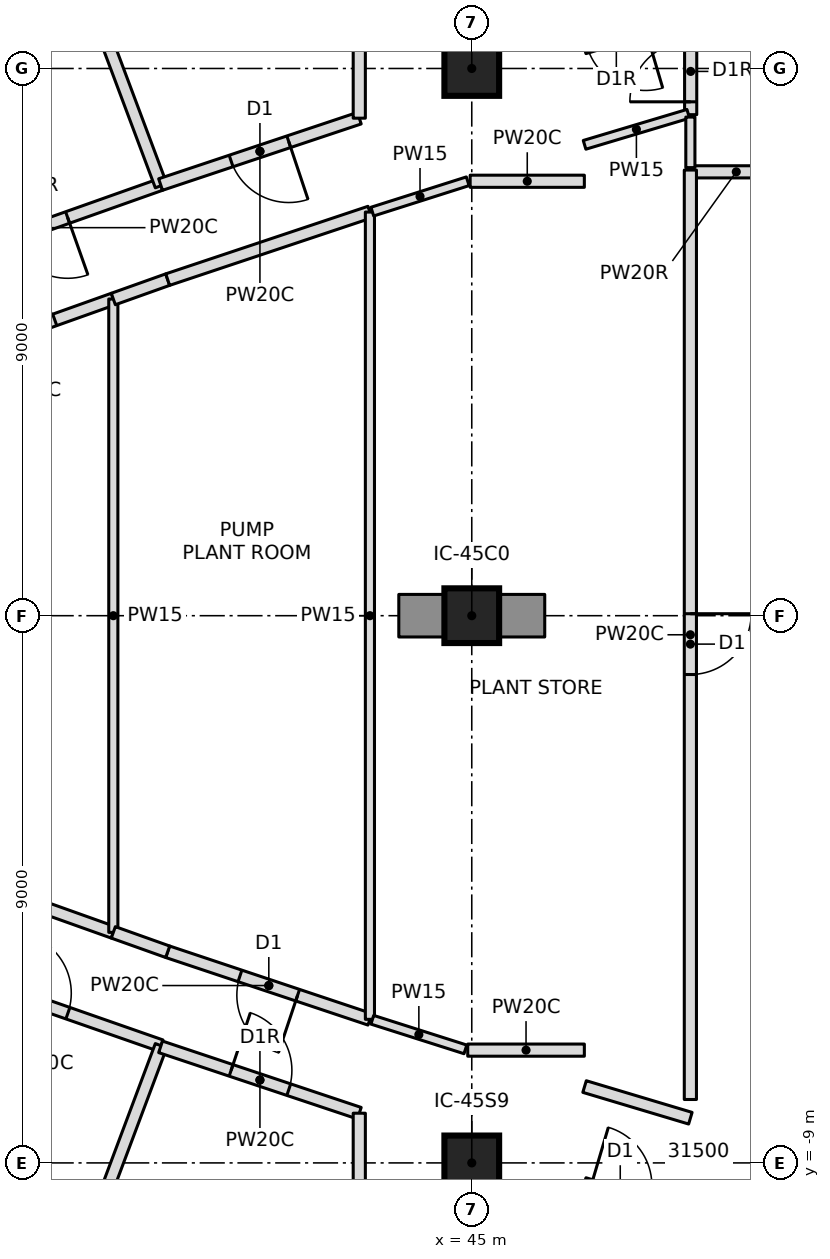
"""IFC4 building model, lengths in metres.
Left out: names, types, materials, properties, quantities, classifications, styles, units other than length and angle.
Written with IfcOpenShell. Run it as: python <this file> out.ifc"""

import sys

from ifc_helpers import new_model, si_unit, direction, frame, frame_2d, origin, origin_2d, place, context, subcontext, project, spatial, rectangle, extrude, element, fill, save


model = new_model("IFC4")
c1 = context("Model", 3, precision=1e-05, world=origin(), true_north=direction((0.0, 1.0)))
c2 = subcontext(c1, "Body", "Model", "MODEL_VIEW")
j1 = project(units=[si_unit("LENGTHUNIT", "METRE"), si_unit("PLANEANGLEUNIT", "RADIAN")], contexts=[c1])
p1 = place(None, origin())
s1 = spatial("IfcSite", under=j1, at=p1, CompositionType="ELEMENT")
p2 = place(p1, origin())
s2 = spatial("IfcBuilding", under=s1, at=p2, CompositionType="ELEMENT")
p3 = place(p2, frame((0.0, 0.0, 256.3)))
s3 = spatial("IfcBuildingStorey", under=s2, at=p3, CompositionType="ELEMENT", Elevation=256.3)
for number, where, z_axis, x_axis in (
    (1, (45.0, -9.0, 0.0), (0.0, 0.0, 1.0), (1.0, 0.0, 0.0)),
    (2, (45.0, 0.0, 0.0), (0.0, 0.0, 1.0), (1.0, 0.0, 0.0)),
    (3, (45.0, 9.0, 0.0), (0.0, 0.0, 1.0), (1.0, 0.0, 0.0)),
):
    element("IfcColumn", number, at=place(p3, frame(where, z_axis=z_axis, x_axis=x_axis)), inside=s3, PredefinedType="COLUMN", context=c2, shape_type="SweptSolid", body=[
        extrude(rectangle(XDim=0.9, YDim=0.9, at=origin_2d()), origin(), (0.0, 0.0, 1.0), 7.0),
    ])
p4 = place(p3, frame((43.8, 0.0, 0.0), z_axis=(0.0, 0.0, 1.0), x_axis=(1.0, 0.0, 0.0)))
e4 = element("IfcWall", 4, at=p4, inside=s3, PredefinedType="SHEAR", context=c2, shape_type="SweptSolid", body=[
    extrude(rectangle(XDim=2.4, YDim=0.7, at=frame_2d((1.2, 0.0))), origin(), (0.0, 0.0, 1.0), 6.7),
])
p5 = place(p3, frame((48.6, 7.3, 0.0), z_axis=(0.0, 0.0, 1.0), x_axis=(1.0, 0.0, 0.0)))
e5 = element("IfcWall", 5, at=p5, inside=s3, PredefinedType="PARTITIONING", context=c2, shape_type="SweptSolid", body=[
    extrude(rectangle(XDim=1.5, YDim=0.2, at=frame_2d((0.75, 0.0))), origin(), (0.0, 0.0, 1.0), 6.7),
])
p6 = place(p3, frame((39.882, 7.091, 0.0), z_axis=(0.0, 0.0, 1.0), x_axis=(-0.942537055217, -0.334101630559, 0.0)))
e6 = element("IfcWall", 6, at=p6, inside=s3, PredefinedType="PARTITIONING", context=c2, shape_type="SweptSolid", body=[
    extrude(rectangle(XDim=4.244, YDim=0.2, at=frame_2d((2.122, 0.0))), origin(), (0.0, 0.0, 1.0), 6.7),
])
p7 = place(p6, frame((1.622, 0.0, 0.0)))
e7 = element("IfcOpeningElement", 7, at=p7, cuts=e6, PredefinedType="OPENING", context=c2, shape_type="SweptSolid", body=[
    extrude(rectangle(XDim=1.0, YDim=2.1, at=frame_2d((0.5, 1.05))), frame((0.0, 0.11, 0.0), z_axis=(0.0, -1.0, 0.0), x_axis=(1.0, 0.0, 0.0)), (0.0, 0.0, 1.0), 0.22),
])
p8 = place(p3, frame((39.889, 7.072, 0.0), z_axis=(0.0, 0.0, 1.0), x_axis=(-0.35112895446, 0.936327110224, 0.0)))
e8 = element("IfcWall", 8, at=p8, inside=s3, PredefinedType="PARTITIONING", context=c2, shape_type="SweptSolid", body=[
    extrude(rectangle(XDim=9.706, YDim=0.2, at=frame_2d((4.853, 0.0))), origin(), (0.0, 0.0, 1.0), 6.7),
])
p9 = place(p3, frame((43.15, 8.183, 0.0), z_axis=(0.0, 0.0, 1.0), x_axis=(-0.948477584784, -0.316844238013, 0.0)))
e9 = element("IfcWall", 9, at=p9, inside=s3, PredefinedType="PARTITIONING", context=c2, shape_type="SweptSolid", body=[
    extrude(rectangle(XDim=3.445, YDim=0.2, at=frame_2d((1.723, 0.0))), origin(), (0.0, 0.0, 1.0), 6.7),
])
p10 = place(p9, frame((1.222, 0.0, 0.0)))
e10 = element("IfcOpeningElement", 10, at=p10, cuts=e9, PredefinedType="OPENING", context=c2, shape_type="SweptSolid", body=[
    extrude(rectangle(XDim=1.0, YDim=2.1, at=frame_2d((0.5, 1.05))), frame((0.0, 0.11, 0.0), z_axis=(0.0, -1.0, 0.0), x_axis=(1.0, 0.0, 0.0)), (0.0, 0.0, 1.0), 0.22),
])
p11 = place(p3, frame((47.969, 9.671, 0.0), z_axis=(0.0, 0.0, 1.0), x_axis=(-0.958867721668, -0.283853293696, 0.0)))
e11 = element("IfcWall", 11, at=p11, inside=s3, PredefinedType="PARTITIONING", context=c2, shape_type="SweptSolid", body=[
    extrude(rectangle(XDim=1.167, YDim=0.2, at=frame_2d((0.583, 0.0))), origin(), (0.0, 0.0, 1.0), 6.7),
])
p12 = place(p11, frame((0.117, 0.0, 0.0)))
e12 = element("IfcOpeningElement", 12, at=p12, cuts=e11, PredefinedType="OPENING", context=c2, shape_type="SweptSolid", body=[
    extrude(rectangle(XDim=1.0, YDim=2.1, at=frame_2d((0.5, 1.05))), frame((0.0, 0.11, 0.0), z_axis=(0.0, -1.0, 0.0), x_axis=(1.0, 0.0, 0.0)), (0.0, 0.0, 1.0), 0.22),
])
p13 = place(p3, frame((35.882, -5.673, 0.0), z_axis=(0.0, 0.0, 1.0), x_axis=(0.944107376821, -0.329638075823, 0.0)))
e13 = element("IfcWall", 13, at=p13, inside=s3, PredefinedType="PARTITIONING", context=c2, shape_type="SweptSolid", body=[
    extrude(rectangle(XDim=4.245, YDim=0.2, at=frame_2d((2.122, 0.0))), origin(), (0.0, 0.0, 1.0), 6.7),
])
p14 = place(p13, frame((1.622, 0.0, 0.0)))
e14 = element("IfcOpeningElement", 14, at=p14, cuts=e13, PredefinedType="OPENING", context=c2, shape_type="SweptSolid", body=[
    extrude(rectangle(XDim=1.0, YDim=2.1, at=frame_2d((0.5, 1.05))), frame((0.0, 0.11, 0.0), z_axis=(0.0, -1.0, 0.0), x_axis=(1.0, 0.0, 0.0)), (0.0, 0.0, 1.0), 0.22),
])
p15 = place(p3, frame((36.481, -16.161, 0.0), z_axis=(0.0, 0.0, 1.0), x_axis=(0.35112895446, 0.936327110224, 0.0)))
e15 = element("IfcWall", 15, at=p15, inside=s3, PredefinedType="PARTITIONING", context=c2, shape_type="SweptSolid", body=[
    extrude(rectangle(XDim=9.706, YDim=0.2, at=frame_2d((4.853, 0.0))), origin(), (0.0, 0.0, 1.0), 6.7),
])
p16 = place(p3, frame((39.882, -7.091, 0.0), z_axis=(0.0, 0.0, 1.0), x_axis=(0.948477584784, -0.316844238013, 0.0)))
e16 = element("IfcWall", 16, at=p16, inside=s3, PredefinedType="PARTITIONING", context=c2, shape_type="SweptSolid", body=[
    extrude(rectangle(XDim=3.445, YDim=0.2, at=frame_2d((1.723, 0.0))), origin(), (0.0, 0.0, 1.0), 6.7),
])
p17 = place(p16, frame((1.222, 0.0, 0.0)))
e17 = element("IfcOpeningElement", 17, at=p17, cuts=e16, PredefinedType="OPENING", context=c2, shape_type="SweptSolid", body=[
    extrude(rectangle(XDim=1.0, YDim=2.1, at=frame_2d((0.5, 1.05))), frame((0.0, 0.11, 0.0), z_axis=(0.0, -1.0, 0.0), x_axis=(1.0, 0.0, 0.0)), (0.0, 0.0, 1.0), 0.22),
])
p18 = place(p3, frame((46.85, -9.34, 0.0), z_axis=(0.0, 0.0, 1.0), x_axis=(0.958867721668, -0.283853293696, 0.0)))
e18 = element("IfcWall", 18, at=p18, inside=s3, PredefinedType="PARTITIONING", context=c2, shape_type="SweptSolid", body=[
    extrude(rectangle(XDim=1.167, YDim=0.2, at=frame_2d((0.583, 0.0))), origin(), (0.0, 0.0, 1.0), 6.7),
])
p19 = place(p18, frame((0.117, 0.0, 0.0)))
e19 = element("IfcOpeningElement", 19, at=p19, cuts=e18, PredefinedType="OPENING", context=c2, shape_type="SweptSolid", body=[
    extrude(rectangle(XDim=1.0, YDim=2.1, at=frame_2d((0.5, 1.05))), frame((0.0, 0.11, 0.0), z_axis=(0.0, -1.0, 0.0), x_axis=(1.0, 0.0, 0.0)), (0.0, 0.0, 1.0), 0.22),
])
p20 = place(p3, frame((36.236, 4.186, 0.0), z_axis=(0.0, 0.0, 1.0), x_axis=(0.941905026751, 0.335879324433, 0.0)))
e20 = element("IfcWall", 20, at=p20, inside=s3, PredefinedType="PARTITIONING", context=c2, shape_type="SweptSolid", body=[
    extrude(rectangle(XDim=3.046, YDim=0.2, at=frame_2d((1.523, 0.0))), origin(), (0.0, 0.0, 1.0), 6.7),
])
p21 = place(p20, frame((1.023, 0.0, 0.0)))
e21 = element("IfcOpeningElement", 21, at=p21, cuts=e20, PredefinedType="OPENING", context=c2, shape_type="SweptSolid", body=[
    extrude(rectangle(XDim=1.0, YDim=2.1, at=frame_2d((0.5, 1.05))), frame((0.0, 0.11, 0.0), z_axis=(0.0, -1.0, 0.0), x_axis=(1.0, 0.0, 0.0)), (0.0, 0.0, 1.0), 0.22),
])
p22 = place(p3, frame((39.105, -5.208, 0.0), z_axis=(0.0, 0.0, 1.0), x_axis=(-0.941905026751, 0.335879324433, 0.0)))
e22 = element("IfcWall", 22, at=p22, inside=s3, PredefinedType="PARTITIONING", context=c2, shape_type="SweptSolid", body=[
    extrude(rectangle(XDim=3.046, YDim=0.2, at=frame_2d((1.523, 0.0))), origin(), (0.0, 0.0, 1.0), 6.7),
])
p23 = place(p3, frame((39.105, -5.208, 0.0), z_axis=(0.0, 0.0, 1.0), x_axis=(0.0, 1.0, 0.0)))
e23 = element("IfcWall", 23, at=p23, inside=s3, PredefinedType="PARTITIONING", context=c2, shape_type="SweptSolid", body=[
    extrude(rectangle(XDim=10.417, YDim=0.15, at=frame_2d((5.208, 0.0))), origin(), (0.0, 0.0, 1.0), 6.7),
])
p24 = place(p3, frame((43.325, -6.638, 0.0), z_axis=(0.0, 0.0, 1.0), x_axis=(-0.948467231483, 0.316875229077, 0.0)))
e24 = element("IfcWall", 24, at=p24, inside=s3, PredefinedType="PARTITIONING", context=c2, shape_type="SweptSolid", body=[
    extrude(rectangle(XDim=3.506, YDim=0.2, at=frame_2d((1.753, 0.0))), origin(), (0.0, 0.0, 1.0), 6.7),
])
p25 = place(p24, frame((1.253, 0.0, 0.0)))
e25 = element("IfcOpeningElement", 25, at=p25, cuts=e24, PredefinedType="OPENING", context=c2, shape_type="SweptSolid", body=[
    extrude(rectangle(XDim=1.0, YDim=2.1, at=frame_2d((0.5, 1.05))), frame((0.0, 0.11, 0.0), z_axis=(0.0, -1.0, 0.0), x_axis=(1.0, 0.0, 0.0)), (0.0, 0.0, 1.0), 0.22),
])
for number, where, z_axis, x_axis in (
    (26, (39.999, -5.527, 0.0), (0.0, 0.0, 1.0), (-0.942, 0.336, 0.0)),
    (27, (39.105, 5.208, 0.0), (0.0, 0.0, 1.0), (0.942, 0.336, 0.0)),
):
    element("IfcWall", number, at=place(p3, frame(where, z_axis=z_axis, x_axis=x_axis)), inside=s3, PredefinedType="PARTITIONING", context=c2, shape_type="SweptSolid", body=[
        extrude(rectangle(XDim=0.949, YDim=0.2, at=frame_2d((0.475, 0.0))), origin(), (0.0, 0.0, 1.0), 6.7),
    ])
p26 = place(p3, frame((39.999, 5.527, 0.0), z_axis=(0.0, 0.0, 1.0), x_axis=(0.948467231483, 0.316875229077, 0.0)))
e28 = element("IfcWall", 28, at=p26, inside=s3, PredefinedType="PARTITIONING", context=c2, shape_type="SweptSolid", body=[
    extrude(rectangle(XDim=3.506, YDim=0.2, at=frame_2d((1.753, 0.0))), origin(), (0.0, 0.0, 1.0), 6.7),
])
p27 = place(p3, frame((43.325, -6.638, 0.0), z_axis=(0.0, 0.0, 1.0), x_axis=(0.0, 1.0, 0.0)))
e29 = element("IfcWall", 29, at=p27, inside=s3, PredefinedType="PARTITIONING", context=c2, shape_type="SweptSolid", body=[
    extrude(rectangle(XDim=13.277, YDim=0.15, at=frame_2d((6.638, 0.0))), origin(), (0.0, 0.0, 1.0), 6.7),
])
p28 = place(p3, frame((48.6, 8.24, 0.0), z_axis=(0.0, 0.0, 1.0), x_axis=(0.0, 1.0, 0.0)))
e30 = element("IfcWall", 30, at=p28, inside=s3, PredefinedType="PARTITIONING", context=c2, shape_type="SweptSolid", body=[
    extrude(rectangle(XDim=1.623, YDim=0.2, at=frame_2d((0.812, 0.0))), origin(), (0.0, 0.0, 1.0), 6.7),
])
p29 = place(p28, frame((0.211, 0.0, 0.0)))
e31 = element("IfcOpeningElement", 31, at=p29, cuts=e30, PredefinedType="OPENING", context=c2, shape_type="SweptSolid", body=[
    extrude(rectangle(XDim=1.0, YDim=2.1, at=frame_2d((0.5, 1.05))), frame((0.0, 0.11, 0.0), z_axis=(0.0, -1.0, 0.0), x_axis=(1.0, 0.0, 0.0)), (0.0, 0.0, 1.0), 0.22),
])
p30 = place(p3, frame((48.595, 7.33, 0.0), z_axis=(0.0, 0.0, 1.0), x_axis=(0.0, -1.0, 0.0)))
e32 = element("IfcWall", 32, at=p30, inside=s3, PredefinedType="PARTITIONING", context=c2, shape_type="SweptSolid", body=[
    extrude(rectangle(XDim=15.287, YDim=0.2, at=frame_2d((7.643, 0.0))), origin(), (0.0, 0.0, 1.0), 6.7),
])
p31 = place(p30, frame((7.297, 0.0, 0.0)))
e33 = element("IfcOpeningElement", 33, at=p31, cuts=e32, PredefinedType="OPENING", context=c2, shape_type="SweptSolid", body=[
    extrude(rectangle(XDim=1.0, YDim=2.1, at=frame_2d((0.5, 1.05))), frame((0.0, 0.11, 0.0), z_axis=(0.0, -1.0, 0.0), x_axis=(1.0, 0.0, 0.0)), (0.0, 0.0, 1.0), 0.22),
])
p32 = place(p3, frame((43.364, 6.646, 0.0), z_axis=(0.0, 0.0, 1.0), x_axis=(0.952937461129, 0.303166942752, 0.0)))
e34 = element("IfcWall", 34, at=p32, inside=s3, PredefinedType="PARTITIONING", context=c2, shape_type="SweptSolid", body=[
    extrude(rectangle(XDim=1.647, YDim=0.15, at=frame_2d((0.823, 0.0))), origin(), (0.0, 0.0, 1.0), 6.7),
])
p33 = place(p3, frame((44.973, 7.145, 0.0), z_axis=(0.0, 0.0, 1.0), x_axis=(0.999999991552, 0.0001299883, 0.0)))
e35 = element("IfcWall", 35, at=p33, inside=s3, PredefinedType="PARTITIONING", context=c2, shape_type="SweptSolid", body=[
    extrude(rectangle(XDim=1.878, YDim=0.2, at=frame_2d((0.939, 0.0))), origin(), (0.0, 0.0, 1.0), 6.7),
])
p34 = place(p3, frame((46.855, 7.744, 0.0), z_axis=(0.0, 0.0, 1.0), x_axis=(0.95802238392, 0.286693410996, 0.0)))
e36 = element("IfcWall", 36, at=p34, inside=s3, PredefinedType="PARTITIONING", context=c2, shape_type="SweptSolid", body=[
    extrude(rectangle(XDim=1.78, YDim=0.15, at=frame_2d((0.89, 0.0))), origin(), (0.0, 0.0, 1.0), 6.7),
])
p35 = place(p3, frame((48.595, 8.201, 0.0), z_axis=(0.0, 0.0, 1.0), x_axis=(0.0, -1.0, 0.0)))
e37 = element("IfcWall", 37, at=p35, inside=s3, PredefinedType="PARTITIONING", context=c2, shape_type="SweptSolid", body=[
    extrude(rectangle(XDim=0.831, YDim=0.15, at=frame_2d((0.416, 0.0))), origin(), (0.0, 0.0, 1.0), 6.7),
])
p36 = place(p3, frame((48.595, -8.265, 0.0), z_axis=(0.0, 0.0, 1.0), x_axis=(-0.958014760688, 0.286718883759, 0.0)))
e38 = element("IfcWall", 38, at=p36, inside=s3, PredefinedType="PARTITIONING", context=c2, shape_type="SweptSolid", body=[
    extrude(rectangle(XDim=1.816, YDim=0.2, at=frame_2d((0.908, 0.0))), origin(), (0.0, 0.0, 1.0), 6.7),
])
p37 = place(p3, frame((46.852, -7.145, 0.0), z_axis=(0.0, 0.0, 1.0), x_axis=(-0.999999991898, 0.000127291241, 0.0)))
e39 = element("IfcWall", 39, at=p37, inside=s3, PredefinedType="PARTITIONING", context=c2, shape_type="SweptSolid", body=[
    extrude(rectangle(XDim=1.918, YDim=0.2, at=frame_2d((0.959, 0.0))), origin(), (0.0, 0.0, 1.0), 6.7),
])
p38 = place(p3, frame((44.896, -7.133, 0.0), z_axis=(0.0, 0.0, 1.0), x_axis=(-0.952953711994, 0.303115857052, 0.0)))
e40 = element("IfcWall", 40, at=p38, inside=s3, PredefinedType="PARTITIONING", context=c2, shape_type="SweptSolid", body=[
    extrude(rectangle(XDim=1.607, YDim=0.15, at=frame_2d((0.803, 0.0))), origin(), (0.0, 0.0, 1.0), 6.7),
])
for number, where, z_axis, x_axis in (
    (41, (43.15, 10.45, 0.0), (0.0, 0.0, 1.0), (0.0, -1.0, 0.0)),
    (42, (43.15, -8.183, 0.0), (0.0, 0.0, 1.0), (0.0, -1.0, 0.0)),
):
    element("IfcWall", number, at=place(p3, frame(where, z_axis=z_axis, x_axis=x_axis)), inside=s3, PredefinedType="PARTITIONING", context=c2, shape_type="SweptSolid", body=[
        extrude(rectangle(XDim=2.267, YDim=0.2, at=frame_2d((1.134, 0.0))), origin(), (0.0, 0.0, 1.0), 6.7),
    ])
p39 = place(p7, origin())
e43 = element("IfcDoor", 43, at=p39, inside=s3, OperationType="SINGLE_SWING_RIGHT", PredefinedType="DOOR", context=c2, shape_type="SweptSolid", body=[
    extrude(rectangle(XDim=1.0, YDim=2.1, at=frame_2d((0.5, 1.05))), frame((0.0, 0.025, 0.0), z_axis=(0.0, -1.0, 0.0), x_axis=(1.0, 0.0, 0.0)), (0.0, 0.0, 1.0), 0.05),
])
fill(e7, e43)
p40 = place(p10, origin())
e44 = element("IfcDoor", 44, at=p40, inside=s3, OperationType="SINGLE_SWING_LEFT", PredefinedType="DOOR", context=c2, shape_type="SweptSolid", body=[
    extrude(rectangle(XDim=1.0, YDim=2.1, at=frame_2d((0.5, 1.05))), frame((0.0, 0.025, 0.0), z_axis=(0.0, -1.0, 0.0), x_axis=(1.0, 0.0, 0.0)), (0.0, 0.0, 1.0), 0.05),
])
fill(e10, e44)
p41 = place(p14, origin())
e45 = element("IfcDoor", 45, at=p41, inside=s3, OperationType="SINGLE_SWING_LEFT", PredefinedType="DOOR", context=c2, shape_type="SweptSolid", body=[
    extrude(rectangle(XDim=1.0, YDim=2.1, at=frame_2d((0.5, 1.05))), frame((0.0, 0.025, 0.0), z_axis=(0.0, -1.0, 0.0), x_axis=(1.0, 0.0, 0.0)), (0.0, 0.0, 1.0), 0.05),
])
fill(e14, e45)
p42 = place(p17, origin())
e46 = element("IfcDoor", 46, at=p42, inside=s3, OperationType="SINGLE_SWING_RIGHT", PredefinedType="DOOR", context=c2, shape_type="SweptSolid", body=[
    extrude(rectangle(XDim=1.0, YDim=2.1, at=frame_2d((0.5, 1.05))), frame((0.0, 0.025, 0.0), z_axis=(0.0, -1.0, 0.0), x_axis=(1.0, 0.0, 0.0)), (0.0, 0.0, 1.0), 0.05),
])
fill(e17, e46)
p43 = place(p21, origin())
e47 = element("IfcDoor", 47, at=p43, inside=s3, OperationType="SINGLE_SWING_RIGHT", PredefinedType="DOOR", context=c2, shape_type="SweptSolid", body=[
    extrude(rectangle(XDim=1.0, YDim=2.1, at=frame_2d((0.5, 1.05))), frame((0.0, 0.025, 0.0), z_axis=(0.0, -1.0, 0.0), x_axis=(1.0, 0.0, 0.0)), (0.0, 0.0, 1.0), 0.05),
])
fill(e21, e47)
p44 = place(p25, origin())
e48 = element("IfcDoor", 48, at=p44, inside=s3, OperationType="SINGLE_SWING_LEFT", PredefinedType="DOOR", context=c2, shape_type="SweptSolid", body=[
    extrude(rectangle(XDim=1.0, YDim=2.1, at=frame_2d((0.5, 1.05))), frame((0.0, 0.025, 0.0), z_axis=(0.0, -1.0, 0.0), x_axis=(1.0, 0.0, 0.0)), (0.0, 0.0, 1.0), 0.05),
])
fill(e25, e48)
p45 = place(p29, origin())
e49 = element("IfcDoor", 49, at=p45, inside=s3, OperationType="SINGLE_SWING_RIGHT", PredefinedType="DOOR", context=c2, shape_type="SweptSolid", body=[
    extrude(rectangle(XDim=1.0, YDim=2.1, at=frame_2d((0.5, 1.05))), frame((0.0, 0.025, 0.0), z_axis=(0.0, -1.0, 0.0), x_axis=(1.0, 0.0, 0.0)), (0.0, 0.0, 1.0), 0.05),
])
fill(e31, e49)
p46 = place(p31, origin())
e50 = element("IfcDoor", 50, at=p46, inside=s3, OperationType="SINGLE_SWING_LEFT", PredefinedType="DOOR", context=c2, shape_type="SweptSolid", body=[
    extrude(rectangle(XDim=1.0, YDim=2.1, at=frame_2d((0.5, 1.05))), frame((0.0, 0.025, 0.0), z_axis=(0.0, -1.0, 0.0), x_axis=(1.0, 0.0, 0.0)), (0.0, 0.0, 1.0), 0.05),
])
fill(e33, e50)
save(model, sys.argv[1])
